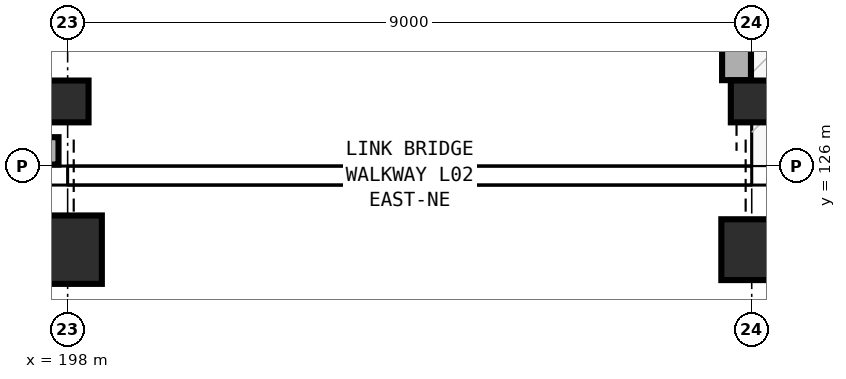
"""IFC4 building model, lengths in metres.
Left out: names, types, materials, properties, quantities, classifications, styles, units other than length and angle.
Written with IfcOpenShell. Run it as: python <this file> out.ifc"""

import sys

from ifc_helpers import new_model, si_unit, direction, frame, frame_2d, origin, origin_2d, place, context, subcontext, project, spatial, rectangle, extrude, element, save


model = new_model("IFC4")
c1 = context("Model", 3, precision=1e-05, world=origin(), true_north=direction((0.0, 1.0)))
c2 = subcontext(c1, "Body", "Model", "MODEL_VIEW")
j1 = project(units=[si_unit("LENGTHUNIT", "METRE"), si_unit("PLANEANGLEUNIT", "RADIAN")], contexts=[c1])
p1 = place(None, origin())
s1 = spatial("IfcSite", under=j1, at=p1, CompositionType="ELEMENT")
p2 = place(p1, origin())
s2 = spatial("IfcBuilding", under=s1, at=p2, CompositionType="ELEMENT")
p3 = place(p2, frame((0.0, 0.0, 9.6)))
s3 = spatial("IfcBuildingStorey", under=s2, at=p3, CompositionType="ELEMENT", Elevation=9.6)
p4 = place(p3, frame((198.0, 124.9, 0.0), z_axis=(0.0, 0.0, 1.0), x_axis=(1.0, 0.0, 0.0)))
e1 = element("IfcColumn", 1, at=p4, inside=s3, PredefinedType="COLUMN", context=c2, shape_type="SweptSolid", body=[
    extrude(rectangle(XDim=0.9, YDim=0.9, at=origin_2d()), origin(), (0.0, 0.0, 1.0), 4.8),
])
p5 = place(p3, frame((207.0, 124.9, 0.0), z_axis=(0.0, 0.0, 1.0), x_axis=(1.0, 0.0, 0.0)))
e2 = element("IfcColumn", 2, at=p5, inside=s3, PredefinedType="COLUMN", context=c2, shape_type="SweptSolid", body=[
    extrude(rectangle(XDim=0.8, YDim=0.8, at=origin_2d()), origin(), (0.0, 0.0, 1.0), 4.8),
])
for number, where, z_axis, x_axis in (
    (3, (198.0, 126.85, 0.0), (0.0, 0.0, 1.0), (1.0, 0.0, 0.0)),
    (4, (207.0, 126.85, 0.0), (0.0, 0.0, 1.0), (1.0, 0.0, 0.0)),
):
    element("IfcColumn", number, at=place(p3, frame(where, z_axis=z_axis, x_axis=x_axis)), inside=s3, PredefinedType="COLUMN", context=c2, shape_type="SweptSolid", body=[
        extrude(rectangle(XDim=0.55, YDim=0.55, at=origin_2d()), origin(), (0.0, 0.0, 1.0), 4.8),
    ])
p6 = place(p3, frame((206.8, 134.72, 0.0), z_axis=(0.0, 0.0, 1.0), x_axis=(0.0, -1.0, 0.0)))
e5 = element("IfcWall", 5, at=p6, inside=s3, PredefinedType="SOLIDWALL", context=c2, shape_type="SweptSolid", body=[
    extrude(rectangle(XDim=7.59, YDim=0.38, at=frame_2d((3.795, 0.0))), origin(), (0.0, 0.0, 1.0), 3.58),
])
p7 = place(p3, frame((197.88, 126.2, 0.0), z_axis=(0.0, 0.0, 1.0), x_axis=(-1.0, 0.0, 0.0)))
e6 = element("IfcWall", 6, at=p7, inside=s3, PredefinedType="SOLIDWALL", context=c2, shape_type="SweptSolid", body=[
    extrude(rectangle(XDim=8.92, YDim=0.36, at=frame_2d((4.46, 0.0))), origin(), (0.0, 0.0, 1.0), 3.58),
])
p8 = place(p7, frame((3.435, 0.0, 0.9)))
e7 = element("IfcOpeningElement", 7, at=p8, cuts=e6, PredefinedType="OPENING", context=c2, shape_type="SweptSolid", body=[
    extrude(rectangle(XDim=2.05, YDim=2.0, at=frame_2d((1.025, 1.0))), frame((0.0, 0.19, 0.0), z_axis=(0.0, -1.0, 0.0), x_axis=(1.0, 0.0, 0.0)), (0.0, 0.0, 1.0), 0.38),
])
save(model, sys.argv[1])
